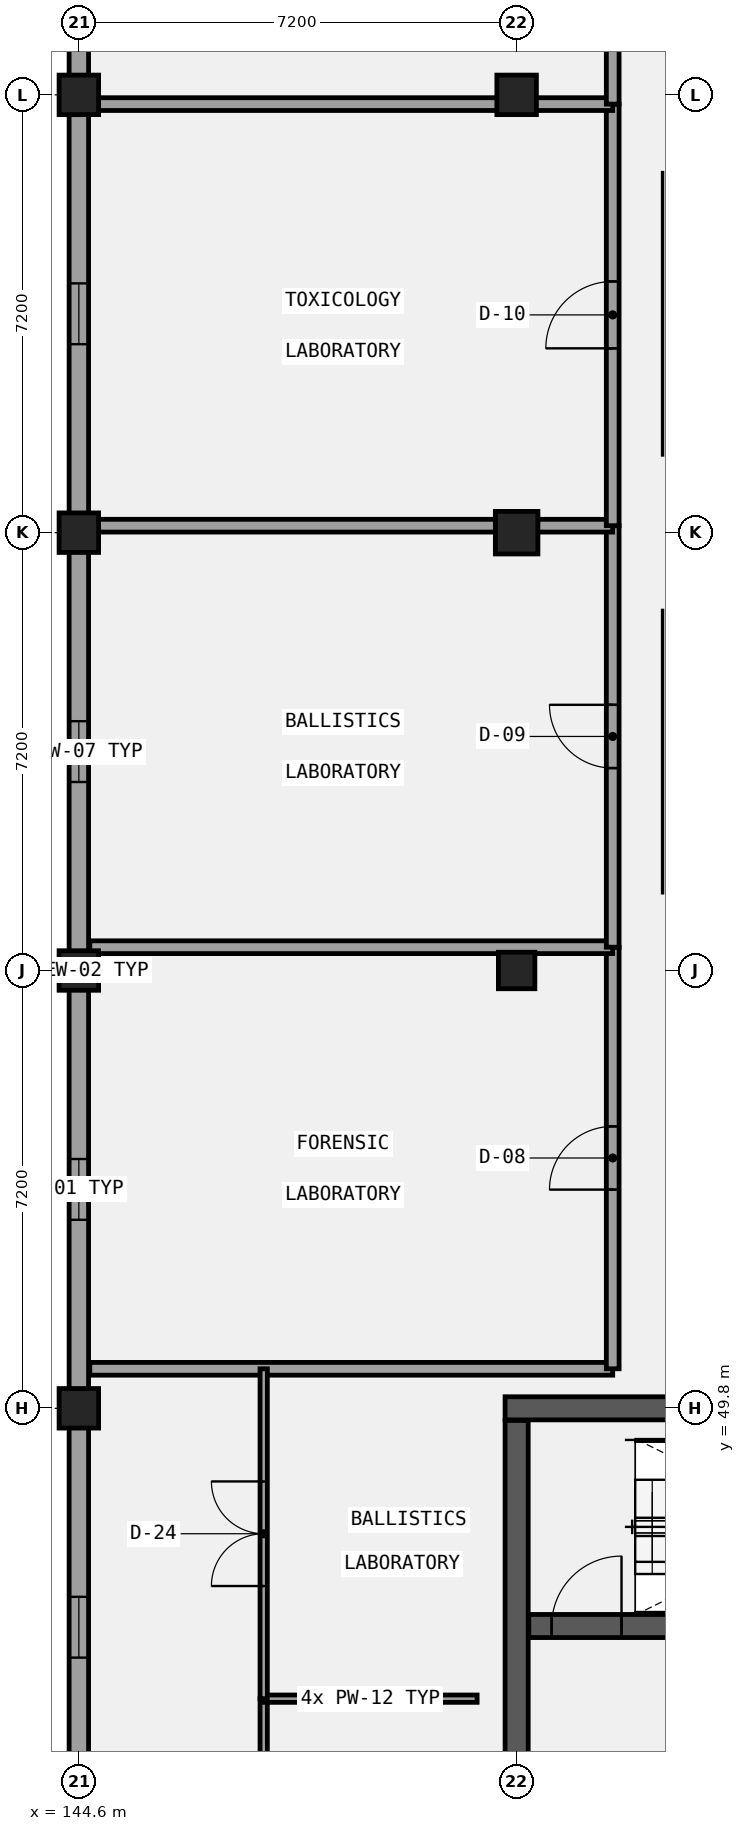
"""IFC4 building model, lengths in metres.
Left out: names, types, materials, properties, quantities, classifications, styles, units other than length and angle.
Written with IfcOpenShell. Run it as: python <this file> out.ifc"""

import sys

from ifc_helpers import new_model, si_unit, direction, frame, frame_2d, origin, origin_2d, place, context, subcontext, project, spatial, rectangle, circle, extrude, element, fill, save


model = new_model("IFC4")
c1 = context("Model", 3, precision=1e-05, world=origin(), true_north=direction((0.0, 1.0)))
c2 = subcontext(c1, "Body", "Model", "MODEL_VIEW")
j1 = project(units=[si_unit("LENGTHUNIT", "METRE"), si_unit("PLANEANGLEUNIT", "RADIAN")], contexts=[c1])
p1 = place(None, origin())
s1 = spatial("IfcSite", under=j1, at=p1, CompositionType="ELEMENT")
p2 = place(p1, origin())
s2 = spatial("IfcBuilding", under=s1, at=p2, CompositionType="ELEMENT")
p3 = place(p2, frame((0.0, 0.0, 9.6)))
s3 = spatial("IfcBuildingStorey", under=s2, at=p3, CompositionType="ELEMENT", Elevation=9.6)
p4 = place(p3, frame((151.61, 49.8, 0.0), z_axis=(0.0, 0.0, 1.0), x_axis=(1.0, 0.0, 0.0)))
e1 = element("IfcWall", 1, at=p4, inside=s3, PredefinedType="SHEAR", context=c2, shape_type="SweptSolid", body=[
    extrude(rectangle(XDim=14.78, YDim=0.38, at=frame_2d((7.39, 0.0))), origin(), (0.0, 0.0, 1.0), 4.2),
])
p5 = place(p3, frame((151.8, 42.8, 0.0), z_axis=(0.0, 0.0, 1.0), x_axis=(0.0, 1.0, 0.0)))
e2 = element("IfcWall", 2, at=p5, inside=s3, PredefinedType="SHEAR", context=c2, shape_type="SweptSolid", body=[
    extrude(rectangle(XDim=6.8, YDim=0.38, at=frame_2d((3.4, 0.0))), origin(), (0.0, 0.0, 1.0), 4.2),
])
p6 = place(p3, frame((152.0, 46.22, 0.0), z_axis=(0.0, 0.0, 1.0), x_axis=(1.0, 0.0, 0.0)))
e3 = element("IfcWall", 3, at=p6, inside=s3, PredefinedType="SHEAR", context=c2, shape_type="SweptSolid", body=[
    extrude(rectangle(XDim=14.0, YDim=0.38, at=frame_2d((7.0, 0.0))), origin(), (0.0, 0.0, 1.0), 4.2),
])
p7 = place(p6, frame((8.14, 0.0, 0.0)))
e4 = element("IfcOpeningElement", 4, at=p7, cuts=e3, PredefinedType="OPENING", context=c2, shape_type="SweptSolid", body=[
    extrude(rectangle(XDim=1.2, YDim=2.15, at=frame_2d((0.6, 1.075))), frame((0.0, 0.2, 0.0), z_axis=(0.0, -1.0, 0.0), x_axis=(1.0, 0.0, 0.0)), (0.0, 0.0, 1.0), 0.4),
])
p8 = place(p6, frame((0.375, 0.0, 0.0)))
e5 = element("IfcOpeningElement", 5, at=p8, cuts=e3, PredefinedType="OPENING", context=c2, shape_type="SweptSolid", body=[
    extrude(rectangle(XDim=1.15, YDim=2.15, at=frame_2d((0.575, 1.075))), frame((0.0, 0.2, 0.0), z_axis=(0.0, -1.0, 0.0), x_axis=(1.0, 0.0, 0.0)), (0.0, 0.0, 1.0), 0.4),
])
for number, where, z_axis, x_axis in (
    (6, (144.6, 49.8, 0.0), (0.0, 0.0, 1.0), (1.0, 0.0, 0.0)),
    (7, (144.6, 57.0, 0.0), (0.0, 0.0, 1.0), (1.0, 0.0, 0.0)),
    (8, (144.6, 64.2, 0.0), (0.0, 0.0, 1.0), (1.0, 0.0, 0.0)),
    (9, (144.6, 71.4, 0.0), (0.0, 0.0, 1.0), (1.0, 0.0, 0.0)),
):
    element("IfcColumn", number, at=place(p3, frame(where, z_axis=z_axis, x_axis=x_axis)), inside=s3, PredefinedType="COLUMN", context=c2, shape_type="SweptSolid", body=[
        extrude(circle(Radius=0.325, at=origin_2d()), origin(), (0.0, 0.0, 1.0), 4.2),
    ])
p9 = place(p3, frame((151.8, 57.0, 0.0), z_axis=(0.0, 0.0, 1.0), x_axis=(1.0, 0.0, 0.0)))
e10 = element("IfcColumn", 10, at=p9, inside=s3, PredefinedType="COLUMN", context=c2, shape_type="SweptSolid", body=[
    extrude(rectangle(XDim=0.6, YDim=0.6, at=origin_2d()), origin(), (0.0, 0.0, 1.0), 4.2),
])
p10 = place(p3, frame((151.8, 64.2, 0.0), z_axis=(0.0, 0.0, 1.0), x_axis=(1.0, 0.0, 0.0)))
e11 = element("IfcColumn", 11, at=p10, inside=s3, PredefinedType="COLUMN", context=c2, shape_type="SweptSolid", body=[
    extrude(rectangle(XDim=0.7, YDim=0.7, at=origin_2d()), origin(), (0.0, 0.0, 1.0), 4.2),
])
p11 = place(p3, frame((151.8, 71.4, 0.0), z_axis=(0.0, 0.0, 1.0), x_axis=(1.0, 0.0, 0.0)))
e12 = element("IfcColumn", 12, at=p11, inside=s3, PredefinedType="COLUMN", context=c2, shape_type="SweptSolid", body=[
    extrude(rectangle(XDim=0.65, YDim=0.65, at=origin_2d()), origin(), (0.0, 0.0, 1.0), 4.2),
])
p12 = place(p3, frame((144.6, 78.44, 0.0), z_axis=(0.0, 0.0, 1.0), x_axis=(0.0, -1.0, 0.0)))
e13 = element("IfcWall", 13, at=p12, inside=s3, PredefinedType="SOLIDWALL", context=c2, shape_type="SweptSolid", body=[
    extrude(rectangle(XDim=42.88, YDim=0.32, at=frame_2d((21.44, 0.0))), origin(), (0.0, 0.0, 1.0), 2.94),
])
p13 = place(p12, frame((38.86, 0.0, 1.0)))
e14 = element("IfcOpeningElement", 14, at=p13, cuts=e13, PredefinedType="OPENING", context=c2, shape_type="SweptSolid", body=[
    extrude(rectangle(XDim=1.0, YDim=1.65, at=frame_2d((0.5, 0.825))), frame((0.0, 0.17, 0.0), z_axis=(0.0, -1.0, 0.0), x_axis=(1.0, 0.0, 0.0)), (0.0, 0.0, 1.0), 0.34),
])
p14 = place(p12, frame((31.74, 0.0, 1.0)))
e15 = element("IfcOpeningElement", 15, at=p14, cuts=e13, PredefinedType="OPENING", context=c2, shape_type="SweptSolid", body=[
    extrude(rectangle(XDim=1.0, YDim=1.65, at=frame_2d((0.5, 0.825))), frame((0.0, 0.17, 0.0), z_axis=(0.0, -1.0, 0.0), x_axis=(1.0, 0.0, 0.0)), (0.0, 0.0, 1.0), 0.34),
])
p15 = place(p12, frame((24.54, 0.0, 1.0)))
e16 = element("IfcOpeningElement", 16, at=p15, cuts=e13, PredefinedType="OPENING", context=c2, shape_type="SweptSolid", body=[
    extrude(rectangle(XDim=1.0, YDim=1.65, at=frame_2d((0.5, 0.825))), frame((0.0, 0.17, 0.0), z_axis=(0.0, -1.0, 0.0), x_axis=(1.0, 0.0, 0.0)), (0.0, 0.0, 1.0), 0.34),
])
p16 = place(p12, frame((17.34, 0.0, 1.0)))
e17 = element("IfcOpeningElement", 17, at=p16, cuts=e13, PredefinedType="OPENING", context=c2, shape_type="SweptSolid", body=[
    extrude(rectangle(XDim=1.0, YDim=1.65, at=frame_2d((0.5, 0.825))), frame((0.0, 0.17, 0.0), z_axis=(0.0, -1.0, 0.0), x_axis=(1.0, 0.0, 0.0)), (0.0, 0.0, 1.0), 0.34),
])
p17 = place(p12, frame((10.14, 0.0, 1.0)))
e18 = element("IfcOpeningElement", 18, at=p17, cuts=e13, PredefinedType="OPENING", context=c2, shape_type="SweptSolid", body=[
    extrude(rectangle(XDim=1.0, YDim=1.65, at=frame_2d((0.5, 0.825))), frame((0.0, 0.17, 0.0), z_axis=(0.0, -1.0, 0.0), x_axis=(1.0, 0.0, 0.0)), (0.0, 0.0, 1.0), 0.34),
])
p18 = place(p12, frame((3.02, 0.0, 1.0)))
e19 = element("IfcOpeningElement", 19, at=p18, cuts=e13, PredefinedType="OPENING", context=c2, shape_type="SweptSolid", body=[
    extrude(rectangle(XDim=1.0, YDim=1.65, at=frame_2d((0.5, 0.825))), frame((0.0, 0.17, 0.0), z_axis=(0.0, -1.0, 0.0), x_axis=(1.0, 0.0, 0.0)), (0.0, 0.0, 1.0), 0.34),
])
p19 = place(p3, frame((144.78, 50.45, 0.0), z_axis=(0.0, 0.0, 1.0), x_axis=(1.0, 0.0, 0.0)))
e20 = element("IfcWall", 20, at=p19, inside=s3, PredefinedType="PARTITIONING", context=c2, shape_type="SweptSolid", body=[
    extrude(rectangle(XDim=8.6, YDim=0.21, at=frame_2d((4.3, 0.0))), origin(), (0.0, 0.0, 1.0), 3.94),
])
p20 = place(p3, frame((153.38, 50.45, 0.0), z_axis=(0.0, 0.0, 1.0), x_axis=(0.0, 1.0, 0.0)))
e21 = element("IfcWall", 21, at=p20, inside=s3, PredefinedType="PARTITIONING", context=c2, shape_type="SweptSolid", body=[
    extrude(rectangle(XDim=6.933, YDim=0.21, at=frame_2d((3.467, 0.0))), origin(), (0.0, 0.0, 1.0), 3.94),
])
p21 = place(p20, frame((2.947, 0.0, 0.0)))
e22 = element("IfcOpeningElement", 22, at=p21, cuts=e21, PredefinedType="OPENING", context=c2, shape_type="SweptSolid", body=[
    extrude(rectangle(XDim=1.04, YDim=2.22, at=frame_2d((0.52, 1.11))), frame((0.0, 0.115, 0.0), z_axis=(0.0, -1.0, 0.0), x_axis=(1.0, 0.0, 0.0)), (0.0, 0.0, 1.0), 0.23),
])
p22 = place(p3, frame((144.78, 57.383, 0.0), z_axis=(0.0, 0.0, 1.0), x_axis=(1.0, 0.0, 0.0)))
e23 = element("IfcWall", 23, at=p22, inside=s3, PredefinedType="PARTITIONING", context=c2, shape_type="SweptSolid", body=[
    extrude(rectangle(XDim=8.6, YDim=0.21, at=frame_2d((4.3, 0.0))), origin(), (0.0, 0.0, 1.0), 3.09),
])
p23 = place(p3, frame((153.38, 57.383, 0.0), z_axis=(0.0, 0.0, 1.0), x_axis=(0.0, 1.0, 0.0)))
e24 = element("IfcWall", 24, at=p23, inside=s3, PredefinedType="PARTITIONING", context=c2, shape_type="SweptSolid", body=[
    extrude(rectangle(XDim=6.932, YDim=0.21, at=frame_2d((3.466, 0.0))), origin(), (0.0, 0.0, 1.0), 3.94),
])
p24 = place(p23, frame((2.946, 0.0, 0.0)))
e25 = element("IfcOpeningElement", 25, at=p24, cuts=e24, PredefinedType="OPENING", context=c2, shape_type="SweptSolid", body=[
    extrude(rectangle(XDim=1.04, YDim=2.35, at=frame_2d((0.52, 1.175))), frame((0.0, 0.115, 0.0), z_axis=(0.0, -1.0, 0.0), x_axis=(1.0, 0.0, 0.0)), (0.0, 0.0, 1.0), 0.23),
])
p25 = place(p3, frame((144.78, 64.315, 0.0), z_axis=(0.0, 0.0, 1.0), x_axis=(1.0, 0.0, 0.0)))
e26 = element("IfcWall", 26, at=p25, inside=s3, PredefinedType="PARTITIONING", context=c2, shape_type="SweptSolid", body=[
    extrude(rectangle(XDim=8.6, YDim=0.21, at=frame_2d((4.3, 0.0))), origin(), (0.0, 0.0, 1.0), 3.04),
])
p26 = place(p3, frame((153.38, 64.315, 0.0), z_axis=(0.0, 0.0, 1.0), x_axis=(0.0, 1.0, 0.0)))
e27 = element("IfcWall", 27, at=p26, inside=s3, PredefinedType="PARTITIONING", context=c2, shape_type="SweptSolid", body=[
    extrude(rectangle(XDim=6.933, YDim=0.21, at=frame_2d((3.467, 0.0))), origin(), (0.0, 0.0, 1.0), 3.94),
])
p27 = place(p26, frame((2.917, 0.0, 0.0)))
e28 = element("IfcOpeningElement", 28, at=p27, cuts=e27, PredefinedType="OPENING", context=c2, shape_type="SweptSolid", body=[
    extrude(rectangle(XDim=1.1, YDim=2.1, at=frame_2d((0.55, 1.05))), frame((0.0, 0.115, 0.0), z_axis=(0.0, -1.0, 0.0), x_axis=(1.0, 0.0, 0.0)), (0.0, 0.0, 1.0), 0.23),
])
p28 = place(p3, frame((144.78, 71.248, 0.0), z_axis=(0.0, 0.0, 1.0), x_axis=(1.0, 0.0, 0.0)))
e29 = element("IfcWall", 29, at=p28, inside=s3, PredefinedType="PARTITIONING", context=c2, shape_type="SweptSolid", body=[
    extrude(rectangle(XDim=8.6, YDim=0.21, at=frame_2d((4.3, 0.0))), origin(), (0.0, 0.0, 1.0), 2.94),
])
p29 = place(p3, frame((153.38, 71.248, 0.0), z_axis=(0.0, 0.0, 1.0), x_axis=(0.0, 1.0, 0.0)))
e30 = element("IfcWall", 30, at=p29, inside=s3, PredefinedType="PARTITIONING", context=c2, shape_type="SweptSolid", body=[
    extrude(rectangle(XDim=6.932, YDim=0.21, at=frame_2d((3.466, 0.0))), origin(), (0.0, 0.0, 1.0), 3.94),
])
p30 = place(p29, frame((2.916, 0.0, 0.0)))
e31 = element("IfcOpeningElement", 31, at=p30, cuts=e30, PredefinedType="OPENING", context=c2, shape_type="SweptSolid", body=[
    extrude(rectangle(XDim=1.1, YDim=2.22, at=frame_2d((0.55, 1.11))), frame((0.0, 0.115, 0.0), z_axis=(0.0, -1.0, 0.0), x_axis=(1.0, 0.0, 0.0)), (0.0, 0.0, 1.0), 0.23),
])
p31 = place(p3, frame((147.64, 39.6, 0.0), z_axis=(0.0, 0.0, 1.0), x_axis=(0.0, 1.0, 0.0)))
e32 = element("IfcWall", 32, at=p31, inside=s3, PredefinedType="PARTITIONING", context=c2, shape_type="SweptSolid", body=[
    extrude(rectangle(XDim=5.425, YDim=0.12, at=frame_2d((2.712, 0.0))), origin(), (0.0, 0.0, 1.0), 3.94),
])
p32 = place(p31, frame((1.853, 0.0, 0.0)))
e33 = element("IfcOpeningElement", 33, at=p32, cuts=e32, PredefinedType="OPENING", context=c2, shape_type="SweptSolid", body=[
    extrude(rectangle(XDim=1.72, YDim=2.22, at=frame_2d((0.86, 1.11))), frame((0.0, 0.07, 0.0), z_axis=(0.0, -1.0, 0.0), x_axis=(1.0, 0.0, 0.0)), (0.0, 0.0, 1.0), 0.14),
])
p33 = place(p3, frame((147.64, 45.025, 0.0), z_axis=(0.0, 0.0, 1.0), x_axis=(1.0, 0.0, 0.0)))
e34 = element("IfcWall", 34, at=p33, inside=s3, PredefinedType="PARTITIONING", context=c2, shape_type="SweptSolid", body=[
    extrude(rectangle(XDim=3.51, YDim=0.12, at=frame_2d((1.755, 0.0))), origin(), (0.0, 0.0, 1.0), 3.94),
])
p34 = place(p3, frame((147.64, 45.025, 0.0), z_axis=(0.0, 0.0, 1.0), x_axis=(0.0, 1.0, 0.0)))
e35 = element("IfcWall", 35, at=p34, inside=s3, PredefinedType="PARTITIONING", context=c2, shape_type="SweptSolid", body=[
    extrude(rectangle(XDim=5.425, YDim=0.12, at=frame_2d((2.712, 0.0))), origin(), (0.0, 0.0, 1.0), 3.94),
])
p35 = place(p34, frame((1.853, 0.0, 0.0)))
e36 = element("IfcOpeningElement", 36, at=p35, cuts=e35, PredefinedType="OPENING", context=c2, shape_type="SweptSolid", body=[
    extrude(rectangle(XDim=1.72, YDim=2.35, at=frame_2d((0.86, 1.175))), frame((0.0, 0.07, 0.0), z_axis=(0.0, -1.0, 0.0), x_axis=(1.0, 0.0, 0.0)), (0.0, 0.0, 1.0), 0.14),
])
p36 = place(p8, origin())
e37 = element("IfcDoor", 37, at=p36, inside=s3, OperationType="SINGLE_SWING_RIGHT", PredefinedType="DOOR", context=c2, shape_type="SweptSolid", body=[
    extrude(rectangle(XDim=1.15, YDim=2.15, at=frame_2d((0.575, 1.075))), frame((0.0, 0.025, 0.0), z_axis=(0.0, -1.0, 0.0), x_axis=(1.0, 0.0, 0.0)), (0.0, 0.0, 1.0), 0.05),
])
fill(e5, e37)
p37 = place(p14, origin())
e38 = element("IfcWindow", 38, at=p37, inside=s3, PartitioningType="SINGLE_PANEL", PredefinedType="WINDOW", context=c2, shape_type="SweptSolid", body=[
    extrude(rectangle(XDim=1.0, YDim=1.65, at=frame_2d((0.5, 0.825))), frame((0.0, 0.03, 0.0), z_axis=(0.0, -1.0, 0.0), x_axis=(1.0, 0.0, 0.0)), (0.0, 0.0, 1.0), 0.06),
])
fill(e15, e38)
p38 = place(p15, origin())
e39 = element("IfcWindow", 39, at=p38, inside=s3, PartitioningType="SINGLE_PANEL", PredefinedType="WINDOW", context=c2, shape_type="SweptSolid", body=[
    extrude(rectangle(XDim=1.0, YDim=1.65, at=frame_2d((0.5, 0.825))), frame((0.0, 0.03, 0.0), z_axis=(0.0, -1.0, 0.0), x_axis=(1.0, 0.0, 0.0)), (0.0, 0.0, 1.0), 0.06),
])
fill(e16, e39)
p39 = place(p16, origin())
e40 = element("IfcWindow", 40, at=p39, inside=s3, PartitioningType="SINGLE_PANEL", PredefinedType="WINDOW", context=c2, shape_type="SweptSolid", body=[
    extrude(rectangle(XDim=1.0, YDim=1.65, at=frame_2d((0.5, 0.825))), frame((0.0, 0.03, 0.0), z_axis=(0.0, -1.0, 0.0), x_axis=(1.0, 0.0, 0.0)), (0.0, 0.0, 1.0), 0.06),
])
fill(e17, e40)
p40 = place(p17, origin())
e41 = element("IfcWindow", 41, at=p40, inside=s3, PartitioningType="SINGLE_PANEL", PredefinedType="WINDOW", context=c2, shape_type="SweptSolid", body=[
    extrude(rectangle(XDim=1.0, YDim=1.65, at=frame_2d((0.5, 0.825))), frame((0.0, 0.03, 0.0), z_axis=(0.0, -1.0, 0.0), x_axis=(1.0, 0.0, 0.0)), (0.0, 0.0, 1.0), 0.06),
])
fill(e18, e41)
p41 = place(p21, frame((1.04, 0.0, 0.0), z_axis=(0.0, 0.0, 1.0), x_axis=(-1.0, 0.0, 0.0)))
e42 = element("IfcDoor", 42, at=p41, inside=s3, OperationType="SINGLE_SWING_LEFT", PredefinedType="DOOR", context=c2, shape_type="SweptSolid", body=[
    extrude(rectangle(XDim=1.04, YDim=2.22, at=frame_2d((0.52, 1.11))), frame((0.0, 0.025, 0.0), z_axis=(0.0, -1.0, 0.0), x_axis=(1.0, 0.0, 0.0)), (0.0, 0.0, 1.0), 0.05),
])
fill(e22, e42)
p42 = place(p24, frame((1.04, 0.0, 0.0), z_axis=(0.0, 0.0, 1.0), x_axis=(-1.0, 0.0, 0.0)))
e43 = element("IfcDoor", 43, at=p42, inside=s3, OperationType="SINGLE_SWING_RIGHT", PredefinedType="DOOR", context=c2, shape_type="SweptSolid", body=[
    extrude(rectangle(XDim=1.04, YDim=2.35, at=frame_2d((0.52, 1.175))), frame((0.0, 0.025, 0.0), z_axis=(0.0, -1.0, 0.0), x_axis=(1.0, 0.0, 0.0)), (0.0, 0.0, 1.0), 0.05),
])
fill(e25, e43)
p43 = place(p27, frame((1.1, 0.0, 0.0), z_axis=(0.0, 0.0, 1.0), x_axis=(-1.0, 0.0, 0.0)))
e44 = element("IfcDoor", 44, at=p43, inside=s3, OperationType="SINGLE_SWING_LEFT", PredefinedType="DOOR", context=c2, shape_type="SweptSolid", body=[
    extrude(rectangle(XDim=1.1, YDim=2.1, at=frame_2d((0.55, 1.05))), frame((0.0, 0.025, 0.0), z_axis=(0.0, -1.0, 0.0), x_axis=(1.0, 0.0, 0.0)), (0.0, 0.0, 1.0), 0.05),
])
fill(e28, e44)
p44 = place(p35, origin())
e45 = element("IfcDoor", 45, at=p44, inside=s3, OperationType="DOUBLE_DOOR_SINGLE_SWING", PredefinedType="DOOR", context=c2, shape_type="SweptSolid", body=[
    extrude(rectangle(XDim=1.72, YDim=2.35, at=frame_2d((0.86, 1.175))), frame((0.0, 0.025, 0.0), z_axis=(0.0, -1.0, 0.0), x_axis=(1.0, 0.0, 0.0)), (0.0, 0.0, 1.0), 0.05),
])
fill(e36, e45)
save(model, sys.argv[1])
